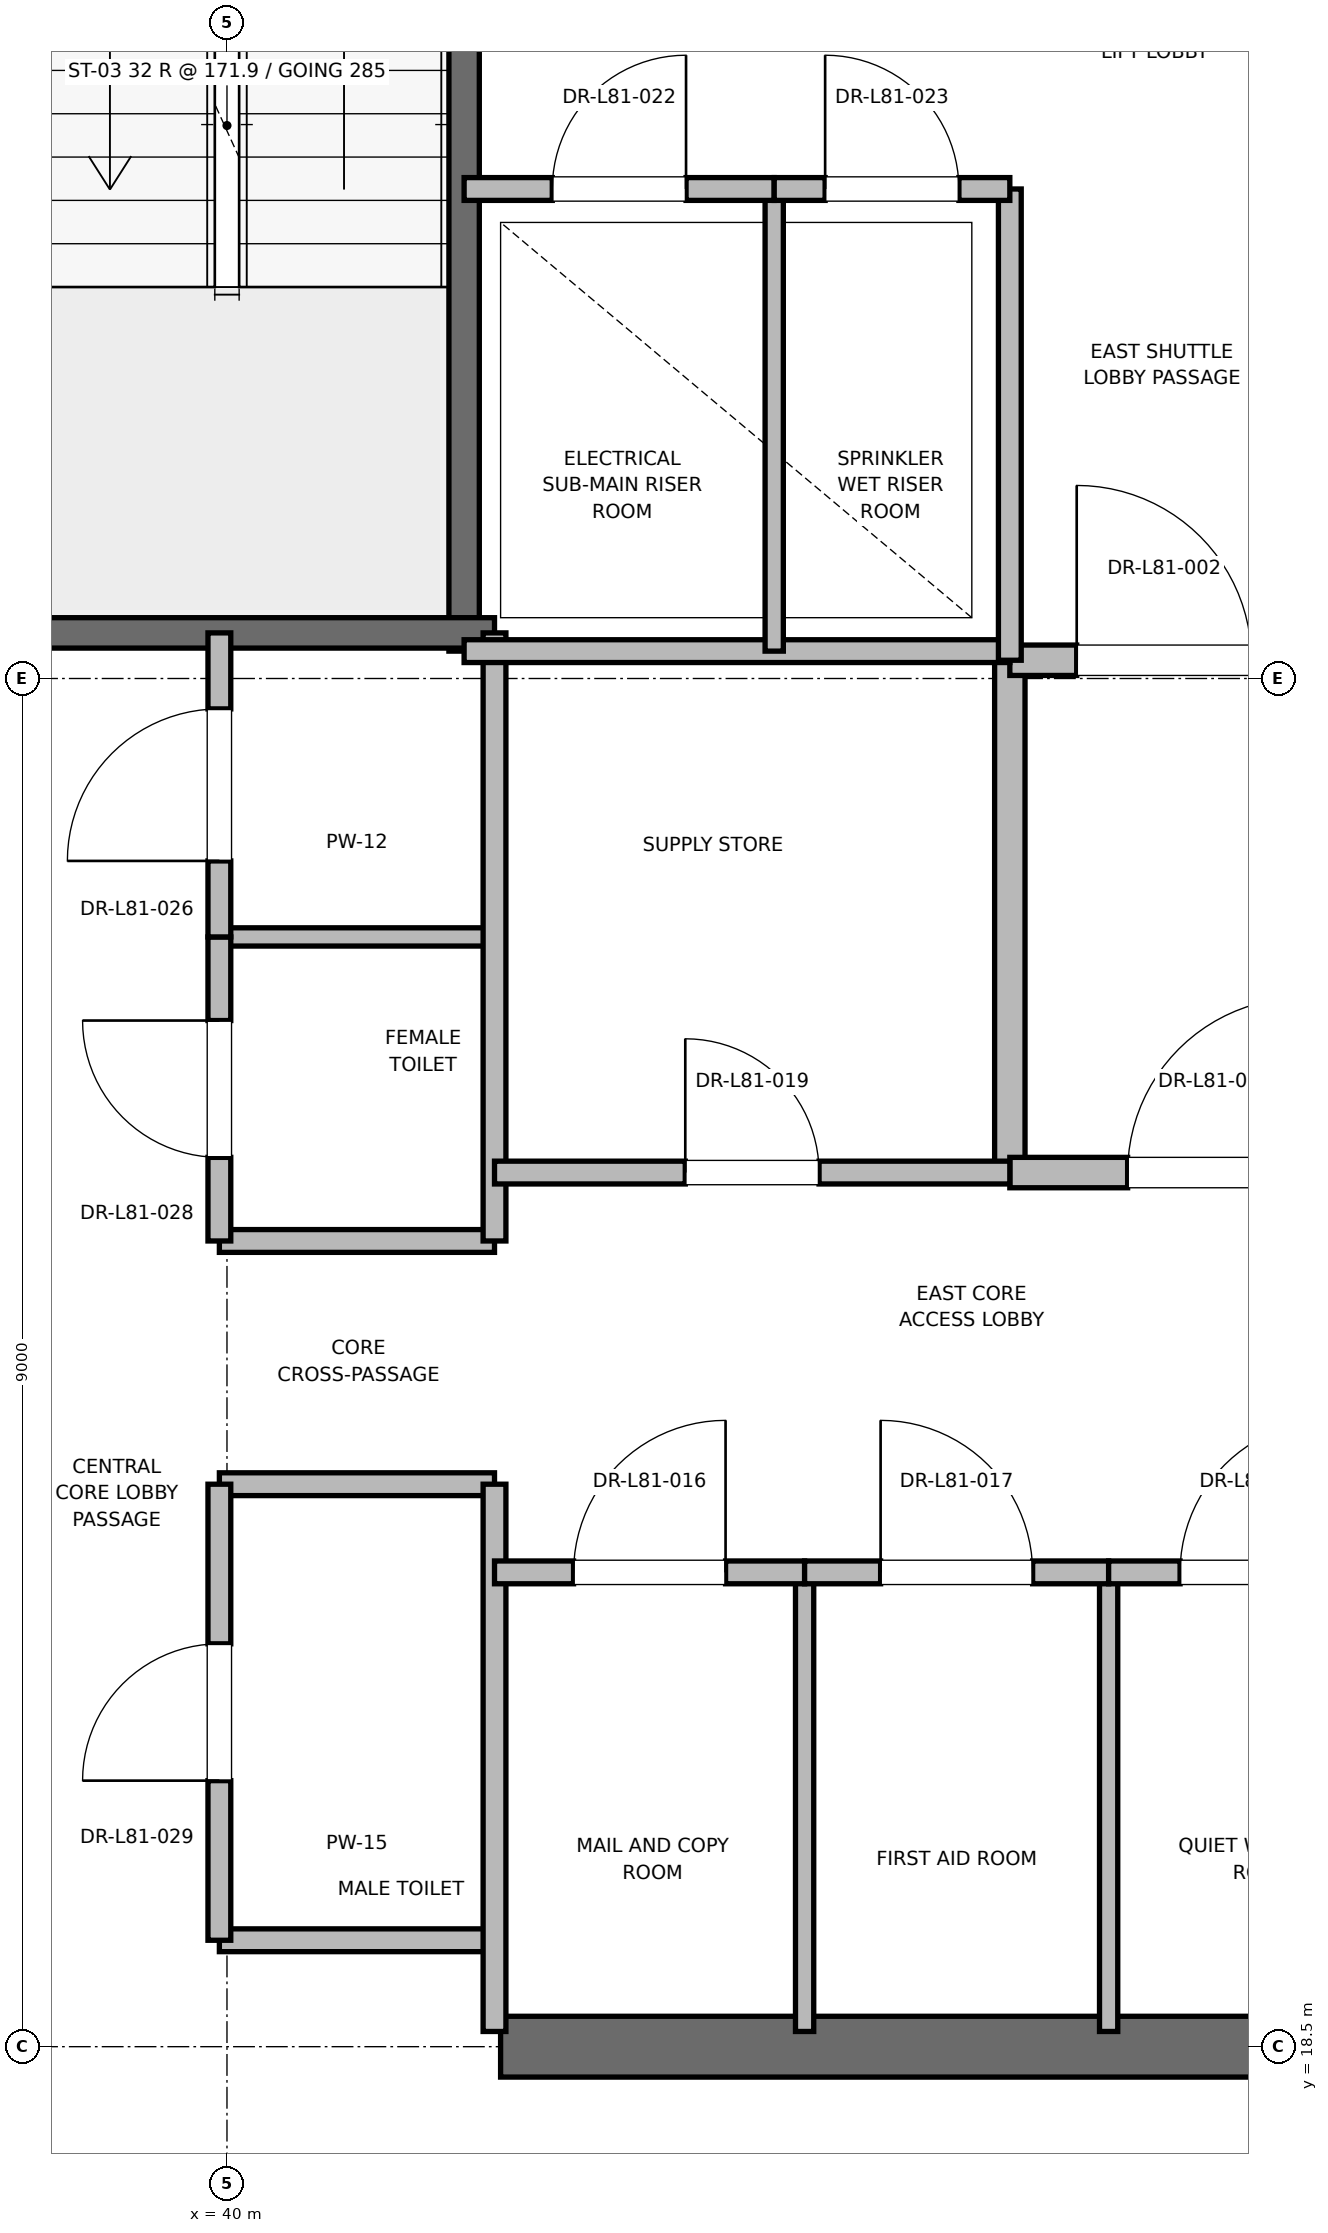
"""IFC4 building model, lengths in metres.
Left out: names, types, materials, properties, quantities, classifications, styles, units other than length and angle.
Written with IfcOpenShell. Run it as: python <this file> out.ifc"""

import sys

from ifc_helpers import new_model, si_unit, direction, frame, frame_2d, origin, place, context, subcontext, project, spatial, rectangle, extrude, element, fill, save


model = new_model("IFC4")
c1 = context("Model", 3, precision=1e-05, world=origin(), true_north=direction((0.0, 1.0)))
c2 = subcontext(c1, "Body", "Model", "MODEL_VIEW")
j1 = project(units=[si_unit("LENGTHUNIT", "METRE"), si_unit("PLANEANGLEUNIT", "RADIAN")], contexts=[c1])
p1 = place(None, origin())
s1 = spatial("IfcSite", under=j1, at=p1, CompositionType="ELEMENT")
p2 = place(p1, origin())
s2 = spatial("IfcBuilding", under=s1, at=p2, CompositionType="ELEMENT")
p3 = place(p2, frame((0.0, 0.0, 348.8)))
s3 = spatial("IfcBuildingStorey", under=s2, at=p3, CompositionType="ELEMENT", Elevation=348.8)
p4 = place(p3, frame((41.8, 18.5, 0.0), z_axis=(0.0, 0.0, 1.0), x_axis=(1.0, 0.0, 0.0)))
e1 = element("IfcWall", 1, at=p4, inside=s3, PredefinedType="SHEAR", context=c2, shape_type="SweptSolid", body=[
    extrude(rectangle(XDim=9.2, YDim=0.4, at=frame_2d((4.6, 0.0))), origin(), (0.0, 0.0, 1.0), 5.2),
])
p5 = place(p3, frame((41.56, 27.68, 0.0), z_axis=(0.0, 0.0, 1.0), x_axis=(0.0, 1.0, 0.0)))
e2 = element("IfcWall", 2, at=p5, inside=s3, PredefinedType="SOLIDWALL", context=c2, shape_type="SweptSolid", body=[
    extrude(rectangle(XDim=8.57, YDim=0.2, at=frame_2d((4.285, 0.0))), origin(), (0.0, 0.0, 1.0), 5.2),
])
p6 = place(p3, frame((38.44, 27.8, 0.0), z_axis=(0.0, 0.0, 1.0), x_axis=(1.0, 0.0, 0.0)))
e3 = element("IfcWall", 3, at=p6, inside=s3, PredefinedType="SOLIDWALL", context=c2, shape_type="SweptSolid", body=[
    extrude(rectangle(XDim=3.32, YDim=0.2, at=frame_2d((1.66, 0.0))), origin(), (0.0, 0.0, 1.0), 5.2),
])
p7 = place(p3, frame((45.15, 24.25, 0.0), z_axis=(0.0, 0.0, 1.0), x_axis=(0.0, 1.0, 0.0)))
e4 = element("IfcWall", 4, at=p7, inside=s3, PredefinedType="PARTITIONING", context=c2, shape_type="SweptSolid", body=[
    extrude(rectangle(XDim=3.37, YDim=0.2, at=frame_2d((1.685, 0.0))), origin(), (0.0, 0.0, 1.0), 5.2),
])
p8 = place(p3, frame((45.15, 24.25, 0.0), z_axis=(0.0, 0.0, 1.0), x_axis=(1.0, 0.0, 0.0)))
e5 = element("IfcWall", 5, at=p8, inside=s3, PredefinedType="PARTITIONING", context=c2, shape_type="SweptSolid", body=[
    extrude(rectangle(XDim=2.7, YDim=0.2, at=frame_2d((1.35, 0.0))), origin(), (0.0, 0.0, 1.0), 5.2),
])
p9 = place(p8, frame((0.775, 0.0, 0.0)))
e6 = element("IfcOpeningElement", 6, at=p9, cuts=e5, PredefinedType="OPENING", context=c2, shape_type="SweptSolid", body=[
    extrude(rectangle(XDim=1.15, YDim=2.2, at=frame_2d((0.575, 1.1))), frame((0.0, 0.1, 0.0), z_axis=(0.0, -1.0, 0.0), x_axis=(1.0, 0.0, 0.0)), (0.0, 0.0, 1.0), 0.2),
])
p10 = place(p3, frame((45.15, 27.62, 0.0), z_axis=(0.0, 0.0, 1.0), x_axis=(1.0, 0.0, 0.0)))
e7 = element("IfcWall", 7, at=p10, inside=s3, PredefinedType="PARTITIONING", context=c2, shape_type="SweptSolid", body=[
    extrude(rectangle(XDim=2.03, YDim=0.2, at=frame_2d((1.015, 0.0))), origin(), (0.0, 0.0, 1.0), 5.2),
])
p11 = place(p10, frame((0.44, 0.0, 0.0)))
e8 = element("IfcOpeningElement", 8, at=p11, cuts=e7, PredefinedType="OPENING", context=c2, shape_type="SweptSolid", body=[
    extrude(rectangle(XDim=1.15, YDim=2.2, at=frame_2d((0.575, 1.1))), frame((0.0, 0.1, 0.0), z_axis=(0.0, -1.0, 0.0), x_axis=(1.0, 0.0, 0.0)), (0.0, 0.0, 1.0), 0.2),
])
for number, where, z_axis, x_axis in (
    (9, (39.95, 19.2, 0.0), (0.0, 0.0, 1.0), (1.0, 0.0, 0.0)),
    (10, (39.95, 22.2, 0.0), (0.0, 0.0, 1.0), (1.0, 0.0, 0.0)),
    (11, (39.95, 23.8, 0.0), (0.0, 0.0, 1.0), (1.0, 0.0, 0.0)),
):
    element("IfcWall", number, at=place(p3, frame(where, z_axis=z_axis, x_axis=x_axis)), inside=s3, PredefinedType="PARTITIONING", context=c2, shape_type="SweptSolid", body=[
        extrude(rectangle(XDim=1.81, YDim=0.15, at=frame_2d((0.905, 0.0))), origin(), (0.0, 0.0, 1.0), 2.85),
    ])
p12 = place(p3, frame((39.95, 25.8, 0.0), z_axis=(0.0, 0.0, 1.0), x_axis=(1.0, 0.0, 0.0)))
e12 = element("IfcWall", 12, at=p12, inside=s3, PredefinedType="PARTITIONING", context=c2, shape_type="SweptSolid", body=[
    extrude(rectangle(XDim=1.81, YDim=0.12, at=frame_2d((0.905, 0.0))), origin(), (0.0, 0.0, 1.0), 2.85),
])
p13 = place(p3, frame((41.76, 18.6, 0.0), z_axis=(0.0, 0.0, 1.0), x_axis=(0.0, 1.0, 0.0)))
e13 = element("IfcWall", 13, at=p13, inside=s3, PredefinedType="PARTITIONING", context=c2, shape_type="SweptSolid", body=[
    extrude(rectangle(XDim=3.6, YDim=0.15, at=frame_2d((1.8, 0.0))), origin(), (0.0, 0.0, 1.0), 2.85),
])
p14 = place(p3, frame((41.76, 23.8, 0.0), z_axis=(0.0, 0.0, 1.0), x_axis=(0.0, 1.0, 0.0)))
e14 = element("IfcWall", 14, at=p14, inside=s3, PredefinedType="PARTITIONING", context=c2, shape_type="SweptSolid", body=[
    extrude(rectangle(XDim=4.0, YDim=0.15, at=frame_2d((2.0, 0.0))), origin(), (0.0, 0.0, 1.0), 2.85),
])
p15 = place(p3, frame((39.95, 19.2, 0.0), z_axis=(0.0, 0.0, 1.0), x_axis=(0.0, 1.0, 0.0)))
e15 = element("IfcWall", 15, at=p15, inside=s3, PredefinedType="PARTITIONING", context=c2, shape_type="SweptSolid", body=[
    extrude(rectangle(XDim=3.0, YDim=0.15, at=frame_2d((1.5, 0.0))), origin(), (0.0, 0.0, 1.0), 2.85),
])
p16 = place(p15, frame((1.05, 0.0, 0.0)))
e16 = element("IfcOpeningElement", 16, at=p16, cuts=e15, PredefinedType="OPENING", context=c2, shape_type="SweptSolid", body=[
    extrude(rectangle(XDim=0.9, YDim=2.1, at=frame_2d((0.45, 1.05))), frame((0.0, 0.075, 0.0), z_axis=(0.0, -1.0, 0.0), x_axis=(1.0, 0.0, 0.0)), (0.0, 0.0, 1.0), 0.15),
])
p17 = place(p3, frame((39.95, 23.8, 0.0), z_axis=(0.0, 0.0, 1.0), x_axis=(0.0, 1.0, 0.0)))
e17 = element("IfcWall", 17, at=p17, inside=s3, PredefinedType="PARTITIONING", context=c2, shape_type="SweptSolid", body=[
    extrude(rectangle(XDim=2.0, YDim=0.15, at=frame_2d((1.0, 0.0))), origin(), (0.0, 0.0, 1.0), 2.85),
])
p18 = place(p17, frame((0.55, 0.0, 0.0)))
e18 = element("IfcOpeningElement", 18, at=p18, cuts=e17, PredefinedType="OPENING", context=c2, shape_type="SweptSolid", body=[
    extrude(rectangle(XDim=0.9, YDim=2.1, at=frame_2d((0.45, 1.05))), frame((0.0, 0.075, 0.0), z_axis=(0.0, -1.0, 0.0), x_axis=(1.0, 0.0, 0.0)), (0.0, 0.0, 1.0), 0.15),
])
p19 = place(p3, frame((39.95, 25.8, 0.0), z_axis=(0.0, 0.0, 1.0), x_axis=(0.0, 1.0, 0.0)))
e19 = element("IfcWall", 19, at=p19, inside=s3, PredefinedType="PARTITIONING", context=c2, shape_type="SweptSolid", body=[
    extrude(rectangle(XDim=2.0, YDim=0.15, at=frame_2d((1.0, 0.0))), origin(), (0.0, 0.0, 1.0), 2.85),
])
p20 = place(p19, frame((0.5, 0.0, 0.0)))
e20 = element("IfcOpeningElement", 20, at=p20, cuts=e19, PredefinedType="OPENING", context=c2, shape_type="SweptSolid", body=[
    extrude(rectangle(XDim=1.0, YDim=2.15, at=frame_2d((0.5, 1.075))), frame((0.0, 0.075, 0.0), z_axis=(0.0, -1.0, 0.0), x_axis=(1.0, 0.0, 0.0)), (0.0, 0.0, 1.0), 0.15),
])
p21 = place(p3, frame((41.56, 27.68, 0.0), z_axis=(0.0, 0.0, 1.0), x_axis=(1.0, 0.0, 0.0)))
e21 = element("IfcWall", 21, at=p21, inside=s3, PredefinedType="PARTITIONING", context=c2, shape_type="SweptSolid", body=[
    extrude(rectangle(XDim=3.59, YDim=0.15, at=frame_2d((1.795, 0.0))), origin(), (0.0, 0.0, 1.0), 2.85),
])
for number, where, z_axis, x_axis in (
    (22, (43.8, 18.6, 0.0), (0.0, 0.0, 1.0), (0.0, 1.0, 0.0)),
    (23, (45.8, 18.6, 0.0), (0.0, 0.0, 1.0), (0.0, 1.0, 0.0)),
):
    element("IfcWall", number, at=place(p3, frame(where, z_axis=z_axis, x_axis=x_axis)), inside=s3, PredefinedType="PARTITIONING", context=c2, shape_type="SweptSolid", body=[
        extrude(rectangle(XDim=3.02, YDim=0.12, at=frame_2d((1.51, 0.0))), origin(), (0.0, 0.0, 1.0), 2.85),
    ])
p22 = place(p3, frame((41.76, 21.62, 0.0), z_axis=(0.0, 0.0, 1.0), x_axis=(1.0, 0.0, 0.0)))
e24 = element("IfcWall", 24, at=p22, inside=s3, PredefinedType="PARTITIONING", context=c2, shape_type="SweptSolid", body=[
    extrude(rectangle(XDim=2.04, YDim=0.15, at=frame_2d((1.02, 0.0))), origin(), (0.0, 0.0, 1.0), 2.85),
])
p23 = place(p22, frame((0.52, 0.0, 0.0)))
e25 = element("IfcOpeningElement", 25, at=p23, cuts=e24, PredefinedType="OPENING", context=c2, shape_type="SweptSolid", body=[
    extrude(rectangle(XDim=1.0, YDim=2.15, at=frame_2d((0.5, 1.075))), frame((0.0, 0.075, 0.0), z_axis=(0.0, -1.0, 0.0), x_axis=(1.0, 0.0, 0.0)), (0.0, 0.0, 1.0), 0.15),
])
p24 = place(p3, frame((43.8, 21.62, 0.0), z_axis=(0.0, 0.0, 1.0), x_axis=(1.0, 0.0, 0.0)))
e26 = element("IfcWall", 26, at=p24, inside=s3, PredefinedType="PARTITIONING", context=c2, shape_type="SweptSolid", body=[
    extrude(rectangle(XDim=2.0, YDim=0.15, at=frame_2d((1.0, 0.0))), origin(), (0.0, 0.0, 1.0), 2.85),
])
p25 = place(p24, frame((0.5, 0.0, 0.0)))
e27 = element("IfcOpeningElement", 27, at=p25, cuts=e26, PredefinedType="OPENING", context=c2, shape_type="SweptSolid", body=[
    extrude(rectangle(XDim=1.0, YDim=2.15, at=frame_2d((0.5, 1.075))), frame((0.0, 0.075, 0.0), z_axis=(0.0, -1.0, 0.0), x_axis=(1.0, 0.0, 0.0)), (0.0, 0.0, 1.0), 0.15),
])
p26 = place(p3, frame((45.8, 21.62, 0.0), z_axis=(0.0, 0.0, 1.0), x_axis=(1.0, 0.0, 0.0)))
e28 = element("IfcWall", 28, at=p26, inside=s3, PredefinedType="PARTITIONING", context=c2, shape_type="SweptSolid", body=[
    extrude(rectangle(XDim=1.94, YDim=0.15, at=frame_2d((0.97, 0.0))), origin(), (0.0, 0.0, 1.0), 2.85),
])
p27 = place(p26, frame((0.47, 0.0, 0.0)))
e29 = element("IfcOpeningElement", 29, at=p27, cuts=e28, PredefinedType="OPENING", context=c2, shape_type="SweptSolid", body=[
    extrude(rectangle(XDim=1.0, YDim=2.15, at=frame_2d((0.5, 1.075))), frame((0.0, 0.075, 0.0), z_axis=(0.0, -1.0, 0.0), x_axis=(1.0, 0.0, 0.0)), (0.0, 0.0, 1.0), 0.15),
])
p28 = place(p3, frame((41.76, 24.25, 0.0), z_axis=(0.0, 0.0, 1.0), x_axis=(1.0, 0.0, 0.0)))
e30 = element("IfcWall", 30, at=p28, inside=s3, PredefinedType="PARTITIONING", context=c2, shape_type="SweptSolid", body=[
    extrude(rectangle(XDim=3.39, YDim=0.15, at=frame_2d((1.695, 0.0))), origin(), (0.0, 0.0, 1.0), 2.85),
])
p29 = place(p28, frame((1.255, 0.0, 0.0)))
e31 = element("IfcOpeningElement", 31, at=p29, cuts=e30, PredefinedType="OPENING", context=c2, shape_type="SweptSolid", body=[
    extrude(rectangle(XDim=0.88, YDim=2.1, at=frame_2d((0.44, 1.05))), frame((0.0, 0.075, 0.0), z_axis=(0.0, -1.0, 0.0), x_axis=(1.0, 0.0, 0.0)), (0.0, 0.0, 1.0), 0.15),
])
p30 = place(p3, frame((45.15, 27.62, 0.0), z_axis=(0.0, 0.0, 1.0), x_axis=(0.0, 1.0, 0.0)))
e32 = element("IfcWall", 32, at=p30, inside=s3, PredefinedType="PARTITIONING", context=c2, shape_type="SweptSolid", body=[
    extrude(rectangle(XDim=3.1, YDim=0.15, at=frame_2d((1.55, 0.0))), origin(), (0.0, 0.0, 1.0), 2.85),
])
p31 = place(p3, frame((43.6, 27.68, 0.0), z_axis=(0.0, 0.0, 1.0), x_axis=(0.0, 1.0, 0.0)))
e33 = element("IfcWall", 33, at=p31, inside=s3, PredefinedType="PARTITIONING", context=c2, shape_type="SweptSolid", body=[
    extrude(rectangle(XDim=3.04, YDim=0.12, at=frame_2d((1.52, 0.0))), origin(), (0.0, 0.0, 1.0), 2.85),
])
p32 = place(p3, frame((41.56, 30.72, 0.0), z_axis=(0.0, 0.0, 1.0), x_axis=(1.0, 0.0, 0.0)))
e34 = element("IfcWall", 34, at=p32, inside=s3, PredefinedType="PARTITIONING", context=c2, shape_type="SweptSolid", body=[
    extrude(rectangle(XDim=2.04, YDim=0.15, at=frame_2d((1.02, 0.0))), origin(), (0.0, 0.0, 1.0), 2.85),
])
p33 = place(p32, frame((0.58, 0.0, 0.0)))
e35 = element("IfcOpeningElement", 35, at=p33, cuts=e34, PredefinedType="OPENING", context=c2, shape_type="SweptSolid", body=[
    extrude(rectangle(XDim=0.88, YDim=2.1, at=frame_2d((0.44, 1.05))), frame((0.0, 0.075, 0.0), z_axis=(0.0, -1.0, 0.0), x_axis=(1.0, 0.0, 0.0)), (0.0, 0.0, 1.0), 0.15),
])
p34 = place(p3, frame((43.6, 30.72, 0.0), z_axis=(0.0, 0.0, 1.0), x_axis=(1.0, 0.0, 0.0)))
e36 = element("IfcWall", 36, at=p34, inside=s3, PredefinedType="PARTITIONING", context=c2, shape_type="SweptSolid", body=[
    extrude(rectangle(XDim=1.55, YDim=0.15, at=frame_2d((0.775, 0.0))), origin(), (0.0, 0.0, 1.0), 2.85),
])
p35 = place(p34, frame((0.335, 0.0, 0.0)))
e37 = element("IfcOpeningElement", 37, at=p35, cuts=e36, PredefinedType="OPENING", context=c2, shape_type="SweptSolid", body=[
    extrude(rectangle(XDim=0.88, YDim=2.1, at=frame_2d((0.44, 1.05))), frame((0.0, 0.075, 0.0), z_axis=(0.0, -1.0, 0.0), x_axis=(1.0, 0.0, 0.0)), (0.0, 0.0, 1.0), 0.15),
])
p36 = place(p9, origin())
e38 = element("IfcDoor", 38, at=p36, inside=s3, OperationType="SINGLE_SWING_RIGHT", PredefinedType="DOOR", context=c2, shape_type="SweptSolid", body=[
    extrude(rectangle(XDim=1.15, YDim=2.2, at=frame_2d((0.575, 1.1))), frame((0.0, 0.025, 0.0), z_axis=(0.0, -1.0, 0.0), x_axis=(1.0, 0.0, 0.0)), (0.0, 0.0, 1.0), 0.05),
])
fill(e6, e38)
p37 = place(p11, origin())
e39 = element("IfcDoor", 39, at=p37, inside=s3, OperationType="SINGLE_SWING_LEFT", PredefinedType="DOOR", context=c2, shape_type="SweptSolid", body=[
    extrude(rectangle(XDim=1.15, YDim=2.2, at=frame_2d((0.575, 1.1))), frame((0.0, 0.025, 0.0), z_axis=(0.0, -1.0, 0.0), x_axis=(1.0, 0.0, 0.0)), (0.0, 0.0, 1.0), 0.05),
])
fill(e8, e39)
p38 = place(p16, origin())
e40 = element("IfcDoor", 40, at=p38, inside=s3, OperationType="SINGLE_SWING_LEFT", PredefinedType="DOOR", context=c2, shape_type="SweptSolid", body=[
    extrude(rectangle(XDim=0.9, YDim=2.1, at=frame_2d((0.45, 1.05))), frame((0.0, 0.025, 0.0), z_axis=(0.0, -1.0, 0.0), x_axis=(1.0, 0.0, 0.0)), (0.0, 0.0, 1.0), 0.05),
])
fill(e16, e40)
p39 = place(p18, origin())
e41 = element("IfcDoor", 41, at=p39, inside=s3, OperationType="SINGLE_SWING_RIGHT", PredefinedType="DOOR", context=c2, shape_type="SweptSolid", body=[
    extrude(rectangle(XDim=0.9, YDim=2.1, at=frame_2d((0.45, 1.05))), frame((0.0, 0.025, 0.0), z_axis=(0.0, -1.0, 0.0), x_axis=(1.0, 0.0, 0.0)), (0.0, 0.0, 1.0), 0.05),
])
fill(e18, e41)
p40 = place(p20, origin())
e42 = element("IfcDoor", 42, at=p40, inside=s3, OperationType="SINGLE_SWING_LEFT", PredefinedType="DOOR", context=c2, shape_type="SweptSolid", body=[
    extrude(rectangle(XDim=1.0, YDim=2.15, at=frame_2d((0.5, 1.075))), frame((0.0, 0.025, 0.0), z_axis=(0.0, -1.0, 0.0), x_axis=(1.0, 0.0, 0.0)), (0.0, 0.0, 1.0), 0.05),
])
fill(e20, e42)
p41 = place(p23, origin())
e43 = element("IfcDoor", 43, at=p41, inside=s3, OperationType="SINGLE_SWING_RIGHT", PredefinedType="DOOR", context=c2, shape_type="SweptSolid", body=[
    extrude(rectangle(XDim=1.0, YDim=2.15, at=frame_2d((0.5, 1.075))), frame((0.0, 0.025, 0.0), z_axis=(0.0, -1.0, 0.0), x_axis=(1.0, 0.0, 0.0)), (0.0, 0.0, 1.0), 0.05),
])
fill(e25, e43)
p42 = place(p25, origin())
e44 = element("IfcDoor", 44, at=p42, inside=s3, OperationType="SINGLE_SWING_LEFT", PredefinedType="DOOR", context=c2, shape_type="SweptSolid", body=[
    extrude(rectangle(XDim=1.0, YDim=2.15, at=frame_2d((0.5, 1.075))), frame((0.0, 0.025, 0.0), z_axis=(0.0, -1.0, 0.0), x_axis=(1.0, 0.0, 0.0)), (0.0, 0.0, 1.0), 0.05),
])
fill(e27, e44)
p43 = place(p27, origin())
e45 = element("IfcDoor", 45, at=p43, inside=s3, OperationType="SINGLE_SWING_RIGHT", PredefinedType="DOOR", context=c2, shape_type="SweptSolid", body=[
    extrude(rectangle(XDim=1.0, YDim=2.15, at=frame_2d((0.5, 1.075))), frame((0.0, 0.025, 0.0), z_axis=(0.0, -1.0, 0.0), x_axis=(1.0, 0.0, 0.0)), (0.0, 0.0, 1.0), 0.05),
])
fill(e29, e45)
p44 = place(p29, origin())
e46 = element("IfcDoor", 46, at=p44, inside=s3, OperationType="SINGLE_SWING_LEFT", PredefinedType="DOOR", context=c2, shape_type="SweptSolid", body=[
    extrude(rectangle(XDim=0.88, YDim=2.1, at=frame_2d((0.44, 1.05))), frame((0.0, 0.025, 0.0), z_axis=(0.0, -1.0, 0.0), x_axis=(1.0, 0.0, 0.0)), (0.0, 0.0, 1.0), 0.05),
])
fill(e31, e46)
p45 = place(p33, origin())
e47 = element("IfcDoor", 47, at=p45, inside=s3, OperationType="SINGLE_SWING_RIGHT", PredefinedType="DOOR", context=c2, shape_type="SweptSolid", body=[
    extrude(rectangle(XDim=0.88, YDim=2.1, at=frame_2d((0.44, 1.05))), frame((0.0, 0.025, 0.0), z_axis=(0.0, -1.0, 0.0), x_axis=(1.0, 0.0, 0.0)), (0.0, 0.0, 1.0), 0.05),
])
fill(e35, e47)
p46 = place(p35, origin())
e48 = element("IfcDoor", 48, at=p46, inside=s3, OperationType="SINGLE_SWING_LEFT", PredefinedType="DOOR", context=c2, shape_type="SweptSolid", body=[
    extrude(rectangle(XDim=0.88, YDim=2.1, at=frame_2d((0.44, 1.05))), frame((0.0, 0.025, 0.0), z_axis=(0.0, -1.0, 0.0), x_axis=(1.0, 0.0, 0.0)), (0.0, 0.0, 1.0), 0.05),
])
fill(e37, e48)
save(model, sys.argv[1])
